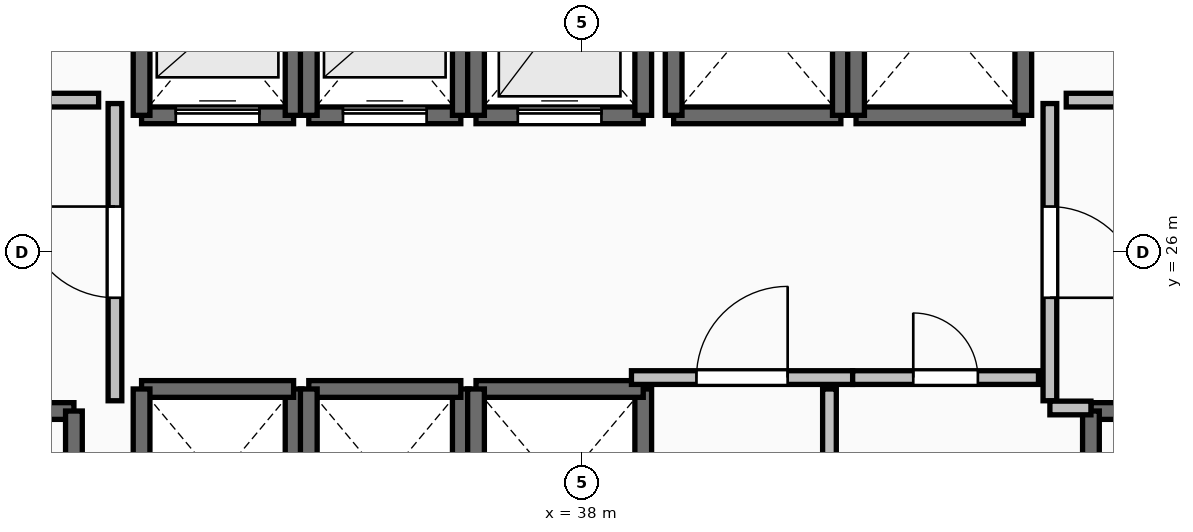
"""IFC4 building model, lengths in metres.
Left out: names, types, materials, properties, quantities, classifications, styles, units other than length and angle.
Written with IfcOpenShell. Run it as: python <this file> out.ifc"""

import sys

from ifc_helpers import new_model, si_unit, direction, frame, frame_2d, origin, place, context, subcontext, project, spatial, rectangle, extrude, element, fill, save


model = new_model("IFC4")
c1 = context("Model", 3, precision=1e-05, world=origin(), true_north=direction((0.0, 1.0)))
c2 = subcontext(c1, "Body", "Model", "MODEL_VIEW")
j1 = project(units=[si_unit("LENGTHUNIT", "METRE"), si_unit("PLANEANGLEUNIT", "RADIAN")], contexts=[c1])
p1 = place(None, origin())
s1 = spatial("IfcSite", under=j1, at=p1, CompositionType="ELEMENT")
p2 = place(p1, origin())
s2 = spatial("IfcBuilding", under=s1, at=p2, CompositionType="ELEMENT")
p3 = place(p2, frame((0.0, 0.0, 48.5)))
s3 = spatial("IfcBuildingStorey", under=s2, at=p3, CompositionType="ELEMENT", Elevation=48.5)
p4 = place(p3, frame((27.94, 23.91, 0.0), z_axis=(0.0, 0.0, 1.0), x_axis=(1.0, 0.0, 0.0)))
e1 = element("IfcWall", 1, at=p4, inside=s3, PredefinedType="SOLIDWALL", context=c2, shape_type="SweptSolid", body=[
    extrude(rectangle(XDim=3.37, YDim=0.22, at=frame_2d((1.685, 0.0))), origin(), (0.0, 0.0, 1.0), 3.24),
])
p5 = place(p4, frame((1.135, 0.0, 0.0)))
e2 = element("IfcOpeningElement", 2, at=p5, cuts=e1, PredefinedType="OPENING", context=c2, shape_type="SweptSolid", body=[
    extrude(rectangle(XDim=1.1, YDim=2.15, at=frame_2d((0.55, 1.075))), frame((0.0, 0.125, 0.0), z_axis=(0.0, -1.0, 0.0), x_axis=(1.0, 0.0, 0.0)), (0.0, 0.0, 1.0), 0.25),
])
p6 = place(p3, frame((31.31, 23.91, 0.0), z_axis=(0.0, 0.0, 1.0), x_axis=(0.0, -1.0, 0.0)))
e3 = element("IfcWall", 3, at=p6, inside=s3, PredefinedType="SOLIDWALL", context=c2, shape_type="SweptSolid", body=[
    extrude(rectangle(XDim=7.42, YDim=0.22, at=frame_2d((3.71, 0.0))), origin(), (0.0, 0.0, 1.0), 3.24),
])
p7 = place(p3, frame((44.69, 23.91, 0.0), z_axis=(0.0, 0.0, 1.0), x_axis=(1.0, 0.0, 0.0)))
e4 = element("IfcWall", 4, at=p7, inside=s3, PredefinedType="SOLIDWALL", context=c2, shape_type="SweptSolid", body=[
    extrude(rectangle(XDim=3.37, YDim=0.22, at=frame_2d((1.685, 0.0))), origin(), (0.0, 0.0, 1.0), 3.24),
])
p8 = place(p7, frame((1.135, 0.0, 0.0)))
e5 = element("IfcOpeningElement", 5, at=p8, cuts=e4, PredefinedType="OPENING", context=c2, shape_type="SweptSolid", body=[
    extrude(rectangle(XDim=1.1, YDim=2.15, at=frame_2d((0.55, 1.075))), frame((0.0, 0.125, 0.0), z_axis=(0.0, -1.0, 0.0), x_axis=(1.0, 0.0, 0.0)), (0.0, 0.0, 1.0), 0.25),
])
p9 = place(p3, frame((44.69, 16.49, 0.0), z_axis=(0.0, 0.0, 1.0), x_axis=(0.0, 1.0, 0.0)))
e6 = element("IfcWall", 6, at=p9, inside=s3, PredefinedType="SOLIDWALL", context=c2, shape_type="SweptSolid", body=[
    extrude(rectangle(XDim=7.42, YDim=0.22, at=frame_2d((3.71, 0.0))), origin(), (0.0, 0.0, 1.0), 3.24),
])
p10 = place(p3, frame((32.2, 27.8, 0.0), z_axis=(0.0, 0.0, 1.0), x_axis=(1.0, 0.0, 0.0)))
e7 = element("IfcWall", 7, at=p10, inside=s3, PredefinedType="SOLIDWALL", context=c2, shape_type="SweptSolid", body=[
    extrude(rectangle(XDim=2.0, YDim=0.22, at=frame_2d((1.0, 0.0))), origin(), (0.0, 0.0, 1.0), 3.24),
])
p11 = place(p10, frame((0.45, 0.0, 0.0)))
e8 = element("IfcOpeningElement", 8, at=p11, cuts=e7, PredefinedType="OPENING", context=c2, shape_type="SweptSolid", body=[
    extrude(rectangle(XDim=1.1, YDim=2.2, at=frame_2d((0.55, 1.1))), frame((0.0, 0.125, 0.0), z_axis=(0.0, -1.0, 0.0), x_axis=(1.0, 0.0, 0.0)), (0.0, 0.0, 1.0), 0.25),
])
for number, where, z_axis, x_axis in (
    (9, (34.2, 27.8, 0.0), (0.0, 0.0, 1.0), (0.0, 1.0, 0.0)),
    (10, (32.2, 30.2, 0.0), (0.0, 0.0, 1.0), (0.0, -1.0, 0.0)),
):
    element("IfcWall", number, at=place(p3, frame(where, z_axis=z_axis, x_axis=x_axis)), inside=s3, PredefinedType="SOLIDWALL", context=c2, shape_type="SweptSolid", body=[
        extrude(rectangle(XDim=2.4, YDim=0.22, at=frame_2d((1.2, 0.0))), origin(), (0.0, 0.0, 1.0), 3.24),
    ])
p12 = place(p3, frame((34.4, 27.8, 0.0), z_axis=(0.0, 0.0, 1.0), x_axis=(1.0, 0.0, 0.0)))
e11 = element("IfcWall", 11, at=p12, inside=s3, PredefinedType="SOLIDWALL", context=c2, shape_type="SweptSolid", body=[
    extrude(rectangle(XDim=2.0, YDim=0.22, at=frame_2d((1.0, 0.0))), origin(), (0.0, 0.0, 1.0), 3.24),
])
p13 = place(p12, frame((0.45, 0.0, 0.0)))
e12 = element("IfcOpeningElement", 12, at=p13, cuts=e11, PredefinedType="OPENING", context=c2, shape_type="SweptSolid", body=[
    extrude(rectangle(XDim=1.1, YDim=2.2, at=frame_2d((0.55, 1.1))), frame((0.0, 0.125, 0.0), z_axis=(0.0, -1.0, 0.0), x_axis=(1.0, 0.0, 0.0)), (0.0, 0.0, 1.0), 0.25),
])
for number, where, z_axis, x_axis in (
    (13, (36.4, 27.8, 0.0), (0.0, 0.0, 1.0), (0.0, 1.0, 0.0)),
    (14, (34.4, 30.2, 0.0), (0.0, 0.0, 1.0), (0.0, -1.0, 0.0)),
):
    element("IfcWall", number, at=place(p3, frame(where, z_axis=z_axis, x_axis=x_axis)), inside=s3, PredefinedType="SOLIDWALL", context=c2, shape_type="SweptSolid", body=[
        extrude(rectangle(XDim=2.4, YDim=0.22, at=frame_2d((1.2, 0.0))), origin(), (0.0, 0.0, 1.0), 3.24),
    ])
p14 = place(p3, frame((36.6, 27.8, 0.0), z_axis=(0.0, 0.0, 1.0), x_axis=(1.0, 0.0, 0.0)))
e15 = element("IfcWall", 15, at=p14, inside=s3, PredefinedType="SOLIDWALL", context=c2, shape_type="SweptSolid", body=[
    extrude(rectangle(XDim=2.2, YDim=0.22, at=frame_2d((1.1, 0.0))), origin(), (0.0, 0.0, 1.0), 3.24),
])
p15 = place(p14, frame((0.55, 0.0, 0.0)))
e16 = element("IfcOpeningElement", 16, at=p15, cuts=e15, PredefinedType="OPENING", context=c2, shape_type="SweptSolid", body=[
    extrude(rectangle(XDim=1.1, YDim=2.2, at=frame_2d((0.55, 1.1))), frame((0.0, 0.125, 0.0), z_axis=(0.0, -1.0, 0.0), x_axis=(1.0, 0.0, 0.0)), (0.0, 0.0, 1.0), 0.25),
])
for number, where, z_axis, x_axis in (
    (17, (38.8, 27.8, 0.0), (0.0, 0.0, 1.0), (0.0, 1.0, 0.0)),
    (18, (36.6, 30.4, 0.0), (0.0, 0.0, 1.0), (0.0, -1.0, 0.0)),
):
    element("IfcWall", number, at=place(p3, frame(where, z_axis=z_axis, x_axis=x_axis)), inside=s3, PredefinedType="SOLIDWALL", context=c2, shape_type="SweptSolid", body=[
        extrude(rectangle(XDim=2.6, YDim=0.22, at=frame_2d((1.3, 0.0))), origin(), (0.0, 0.0, 1.0), 3.24),
    ])
p16 = place(p3, frame((34.2, 21.8, 0.0), z_axis=(0.0, 0.0, 1.0), x_axis=(0.0, 1.0, 0.0)))
e19 = element("IfcWall", 19, at=p16, inside=s3, PredefinedType="SOLIDWALL", context=c2, shape_type="SweptSolid", body=[
    extrude(rectangle(XDim=2.4, YDim=0.22, at=frame_2d((1.2, 0.0))), origin(), (0.0, 0.0, 1.0), 3.24),
])
p17 = place(p3, frame((34.2, 24.2, 0.0), z_axis=(0.0, 0.0, 1.0), x_axis=(-1.0, 0.0, 0.0)))
e20 = element("IfcWall", 20, at=p17, inside=s3, PredefinedType="SOLIDWALL", context=c2, shape_type="SweptSolid", body=[
    extrude(rectangle(XDim=2.0, YDim=0.22, at=frame_2d((1.0, 0.0))), origin(), (0.0, 0.0, 1.0), 3.24),
])
for number, where, z_axis, x_axis in (
    (21, (32.2, 24.2, 0.0), (0.0, 0.0, 1.0), (0.0, -1.0, 0.0)),
    (22, (36.4, 21.8, 0.0), (0.0, 0.0, 1.0), (0.0, 1.0, 0.0)),
):
    element("IfcWall", number, at=place(p3, frame(where, z_axis=z_axis, x_axis=x_axis)), inside=s3, PredefinedType="SOLIDWALL", context=c2, shape_type="SweptSolid", body=[
        extrude(rectangle(XDim=2.4, YDim=0.22, at=frame_2d((1.2, 0.0))), origin(), (0.0, 0.0, 1.0), 3.24),
    ])
p18 = place(p3, frame((36.4, 24.2, 0.0), z_axis=(0.0, 0.0, 1.0), x_axis=(-1.0, 0.0, 0.0)))
e23 = element("IfcWall", 23, at=p18, inside=s3, PredefinedType="SOLIDWALL", context=c2, shape_type="SweptSolid", body=[
    extrude(rectangle(XDim=2.0, YDim=0.22, at=frame_2d((1.0, 0.0))), origin(), (0.0, 0.0, 1.0), 3.24),
])
p19 = place(p3, frame((34.4, 24.2, 0.0), z_axis=(0.0, 0.0, 1.0), x_axis=(0.0, -1.0, 0.0)))
e24 = element("IfcWall", 24, at=p19, inside=s3, PredefinedType="SOLIDWALL", context=c2, shape_type="SweptSolid", body=[
    extrude(rectangle(XDim=2.4, YDim=0.22, at=frame_2d((1.2, 0.0))), origin(), (0.0, 0.0, 1.0), 3.24),
])
p20 = place(p3, frame((38.8, 21.6, 0.0), z_axis=(0.0, 0.0, 1.0), x_axis=(0.0, 1.0, 0.0)))
e25 = element("IfcWall", 25, at=p20, inside=s3, PredefinedType="SOLIDWALL", context=c2, shape_type="SweptSolid", body=[
    extrude(rectangle(XDim=2.6, YDim=0.22, at=frame_2d((1.3, 0.0))), origin(), (0.0, 0.0, 1.0), 3.24),
])
p21 = place(p3, frame((38.8, 24.2, 0.0), z_axis=(0.0, 0.0, 1.0), x_axis=(-1.0, 0.0, 0.0)))
e26 = element("IfcWall", 26, at=p21, inside=s3, PredefinedType="SOLIDWALL", context=c2, shape_type="SweptSolid", body=[
    extrude(rectangle(XDim=2.2, YDim=0.22, at=frame_2d((1.1, 0.0))), origin(), (0.0, 0.0, 1.0), 3.24),
])
p22 = place(p3, frame((36.6, 24.2, 0.0), z_axis=(0.0, 0.0, 1.0), x_axis=(0.0, -1.0, 0.0)))
e27 = element("IfcWall", 27, at=p22, inside=s3, PredefinedType="SOLIDWALL", context=c2, shape_type="SweptSolid", body=[
    extrude(rectangle(XDim=2.6, YDim=0.22, at=frame_2d((1.3, 0.0))), origin(), (0.0, 0.0, 1.0), 3.24),
])
p23 = place(p3, frame((39.2, 27.8, 0.0), z_axis=(0.0, 0.0, 1.0), x_axis=(1.0, 0.0, 0.0)))
e28 = element("IfcWall", 28, at=p23, inside=s3, PredefinedType="SOLIDWALL", context=c2, shape_type="SweptSolid", body=[
    extrude(rectangle(XDim=2.2, YDim=0.22, at=frame_2d((1.1, 0.0))), origin(), (0.0, 0.0, 1.0), 3.24),
])
for number, where, z_axis, x_axis in (
    (29, (41.4, 27.8, 0.0), (0.0, 0.0, 1.0), (0.0, 1.0, 0.0)),
    (30, (39.2, 30.4, 0.0), (0.0, 0.0, 1.0), (0.0, -1.0, 0.0)),
):
    element("IfcWall", number, at=place(p3, frame(where, z_axis=z_axis, x_axis=x_axis)), inside=s3, PredefinedType="SOLIDWALL", context=c2, shape_type="SweptSolid", body=[
        extrude(rectangle(XDim=2.6, YDim=0.22, at=frame_2d((1.3, 0.0))), origin(), (0.0, 0.0, 1.0), 3.24),
    ])
p24 = place(p3, frame((41.6, 27.8, 0.0), z_axis=(0.0, 0.0, 1.0), x_axis=(1.0, 0.0, 0.0)))
e31 = element("IfcWall", 31, at=p24, inside=s3, PredefinedType="SOLIDWALL", context=c2, shape_type="SweptSolid", body=[
    extrude(rectangle(XDim=2.2, YDim=0.22, at=frame_2d((1.1, 0.0))), origin(), (0.0, 0.0, 1.0), 3.24),
])
for number, where, z_axis, x_axis in (
    (32, (43.8, 27.8, 0.0), (0.0, 0.0, 1.0), (0.0, 1.0, 0.0)),
    (33, (41.6, 30.4, 0.0), (0.0, 0.0, 1.0), (0.0, -1.0, 0.0)),
):
    element("IfcWall", number, at=place(p3, frame(where, z_axis=z_axis, x_axis=x_axis)), inside=s3, PredefinedType="SOLIDWALL", context=c2, shape_type="SweptSolid", body=[
        extrude(rectangle(XDim=2.6, YDim=0.22, at=frame_2d((1.3, 0.0))), origin(), (0.0, 0.0, 1.0), 3.24),
    ])
p25 = place(p3, frame((31.85, 24.045, 0.0), z_axis=(0.0, 0.0, 1.0), x_axis=(0.0, 1.0, 0.0)))
e34 = element("IfcWall", 34, at=p25, inside=s3, PredefinedType="PARTITIONING", context=c2, shape_type="SweptSolid", body=[
    extrude(rectangle(XDim=3.91, YDim=0.18, at=frame_2d((1.955, 0.0))), origin(), (0.0, 0.0, 1.0), 3.24),
])
p26 = place(p25, frame((1.355, 0.0, 0.0)))
e35 = element("IfcOpeningElement", 35, at=p26, cuts=e34, PredefinedType="OPENING", context=c2, shape_type="SweptSolid", body=[
    extrude(rectangle(XDim=1.2, YDim=2.15, at=frame_2d((0.6, 1.075))), frame((0.0, 0.105, 0.0), z_axis=(0.0, -1.0, 0.0), x_axis=(1.0, 0.0, 0.0)), (0.0, 0.0, 1.0), 0.21),
])
p27 = place(p3, frame((44.15, 27.955, 0.0), z_axis=(0.0, 0.0, 1.0), x_axis=(0.0, -1.0, 0.0)))
e36 = element("IfcWall", 36, at=p27, inside=s3, PredefinedType="PARTITIONING", context=c2, shape_type="SweptSolid", body=[
    extrude(rectangle(XDim=3.91, YDim=0.18, at=frame_2d((1.955, 0.0))), origin(), (0.0, 0.0, 1.0), 3.24),
])
p28 = place(p27, frame((1.355, 0.0, 0.0)))
e37 = element("IfcOpeningElement", 37, at=p28, cuts=e36, PredefinedType="OPENING", context=c2, shape_type="SweptSolid", body=[
    extrude(rectangle(XDim=1.2, YDim=2.15, at=frame_2d((0.6, 1.075))), frame((0.0, 0.105, 0.0), z_axis=(0.0, -1.0, 0.0), x_axis=(1.0, 0.0, 0.0)), (0.0, 0.0, 1.0), 0.21),
])
p29 = place(p3, frame((44.15, 23.95, 0.0), z_axis=(0.0, 0.0, 1.0), x_axis=(1.0, 0.0, 0.0)))
e38 = element("IfcWall", 38, at=p29, inside=s3, PredefinedType="PARTITIONING", context=c2, shape_type="SweptSolid", body=[
    extrude(rectangle(XDim=0.54, YDim=0.18, at=frame_2d((0.27, 0.0))), origin(), (0.0, 0.0, 1.0), 3.24),
])
p30 = place(p3, frame((38.645, 24.35, 0.0), z_axis=(0.0, 0.0, 1.0), x_axis=(1.0, 0.0, 0.0)))
e39 = element("IfcWall", 39, at=p30, inside=s3, PredefinedType="PARTITIONING", context=c2, shape_type="SweptSolid", body=[
    extrude(rectangle(XDim=2.91, YDim=0.18, at=frame_2d((1.455, 0.0))), origin(), (0.0, 0.0, 1.0), 3.24),
])
p31 = place(p30, frame((0.855, 0.0, 0.0)))
e40 = element("IfcOpeningElement", 40, at=p31, cuts=e39, PredefinedType="OPENING", context=c2, shape_type="SweptSolid", body=[
    extrude(rectangle(XDim=1.2, YDim=2.15, at=frame_2d((0.6, 1.075))), frame((0.0, 0.105, 0.0), z_axis=(0.0, -1.0, 0.0), x_axis=(1.0, 0.0, 0.0)), (0.0, 0.0, 1.0), 0.21),
])
p32 = place(p3, frame((41.555, 24.35, 0.0), z_axis=(0.0, 0.0, 1.0), x_axis=(1.0, 0.0, 0.0)))
e41 = element("IfcWall", 41, at=p32, inside=s3, PredefinedType="PARTITIONING", context=c2, shape_type="SweptSolid", body=[
    extrude(rectangle(XDim=2.445, YDim=0.18, at=frame_2d((1.223, 0.0))), origin(), (0.0, 0.0, 1.0), 3.24),
])
p33 = place(p32, frame((0.798, 0.0, 0.0)))
e42 = element("IfcOpeningElement", 42, at=p33, cuts=e41, PredefinedType="OPENING", context=c2, shape_type="SweptSolid", body=[
    extrude(rectangle(XDim=0.85, YDim=2.1, at=frame_2d((0.425, 1.05))), frame((0.0, 0.105, 0.0), z_axis=(0.0, -1.0, 0.0), x_axis=(1.0, 0.0, 0.0)), (0.0, 0.0, 1.0), 0.21),
])
p34 = place(p3, frame((41.25, 20.305, 0.0), z_axis=(0.0, 0.0, 1.0), x_axis=(0.0, 1.0, 0.0)))
e43 = element("IfcWall", 43, at=p34, inside=s3, PredefinedType="PARTITIONING", context=c2, shape_type="SweptSolid", body=[
    extrude(rectangle(XDim=3.895, YDim=0.18, at=frame_2d((1.948, 0.0))), origin(), (0.0, 0.0, 1.0), 3.24),
])
p35 = place(p34, frame((1.522, 0.0, 0.0)))
e44 = element("IfcOpeningElement", 44, at=p35, cuts=e43, PredefinedType="OPENING", context=c2, shape_type="SweptSolid", body=[
    extrude(rectangle(XDim=0.85, YDim=2.1, at=frame_2d((0.425, 1.05))), frame((0.0, 0.105, 0.0), z_axis=(0.0, -1.0, 0.0), x_axis=(1.0, 0.0, 0.0)), (0.0, 0.0, 1.0), 0.21),
])
for number, where, z_axis, x_axis in (
    (45, (31.635, 28.0, 0.0), (0.0, 0.0, 1.0), (-1.0, 0.0, 0.0)),
    (46, (45.28, 28.0, 0.0), (0.0, 0.0, 1.0), (-1.0, 0.0, 0.0)),
):
    element("IfcWall", number, at=place(p3, frame(where, z_axis=z_axis, x_axis=x_axis)), inside=s3, PredefinedType="PARTITIONING", context=c2, shape_type="SweptSolid", body=[
        extrude(rectangle(XDim=0.915, YDim=0.18, at=frame_2d((0.458, 0.0))), origin(), (0.0, 0.0, 1.0), 3.24),
    ])
p36 = place(p11, origin())
e47 = element("IfcDoor", 47, at=p36, inside=s3, OperationType="SLIDING_TO_LEFT", PredefinedType="DOOR", context=c2, shape_type="SweptSolid", body=[
    extrude(rectangle(XDim=1.1, YDim=2.2, at=frame_2d((0.55, 1.1))), frame((0.0, 0.025, 0.0), z_axis=(0.0, -1.0, 0.0), x_axis=(1.0, 0.0, 0.0)), (0.0, 0.0, 1.0), 0.05),
])
fill(e8, e47)
p37 = place(p13, origin())
e48 = element("IfcDoor", 48, at=p37, inside=s3, OperationType="SLIDING_TO_LEFT", PredefinedType="DOOR", context=c2, shape_type="SweptSolid", body=[
    extrude(rectangle(XDim=1.1, YDim=2.2, at=frame_2d((0.55, 1.1))), frame((0.0, 0.025, 0.0), z_axis=(0.0, -1.0, 0.0), x_axis=(1.0, 0.0, 0.0)), (0.0, 0.0, 1.0), 0.05),
])
fill(e12, e48)
p38 = place(p15, origin())
e49 = element("IfcDoor", 49, at=p38, inside=s3, OperationType="SLIDING_TO_LEFT", PredefinedType="DOOR", context=c2, shape_type="SweptSolid", body=[
    extrude(rectangle(XDim=1.1, YDim=2.2, at=frame_2d((0.55, 1.1))), frame((0.0, 0.025, 0.0), z_axis=(0.0, -1.0, 0.0), x_axis=(1.0, 0.0, 0.0)), (0.0, 0.0, 1.0), 0.05),
])
fill(e16, e49)
p39 = place(p26, origin())
e50 = element("IfcDoor", 50, at=p39, inside=s3, OperationType="SINGLE_SWING_RIGHT", PredefinedType="DOOR", context=c2, shape_type="SweptSolid", body=[
    extrude(rectangle(XDim=1.2, YDim=2.15, at=frame_2d((0.6, 1.075))), frame((0.0, 0.025, 0.0), z_axis=(0.0, -1.0, 0.0), x_axis=(1.0, 0.0, 0.0)), (0.0, 0.0, 1.0), 0.05),
])
fill(e35, e50)
p40 = place(p28, origin())
e51 = element("IfcDoor", 51, at=p40, inside=s3, OperationType="SINGLE_SWING_RIGHT", PredefinedType="DOOR", context=c2, shape_type="SweptSolid", body=[
    extrude(rectangle(XDim=1.2, YDim=2.15, at=frame_2d((0.6, 1.075))), frame((0.0, 0.025, 0.0), z_axis=(0.0, -1.0, 0.0), x_axis=(1.0, 0.0, 0.0)), (0.0, 0.0, 1.0), 0.05),
])
fill(e37, e51)
p41 = place(p31, origin())
e52 = element("IfcDoor", 52, at=p41, inside=s3, OperationType="SINGLE_SWING_RIGHT", PredefinedType="DOOR", context=c2, shape_type="SweptSolid", body=[
    extrude(rectangle(XDim=1.2, YDim=2.15, at=frame_2d((0.6, 1.075))), frame((0.0, 0.025, 0.0), z_axis=(0.0, -1.0, 0.0), x_axis=(1.0, 0.0, 0.0)), (0.0, 0.0, 1.0), 0.05),
])
fill(e40, e52)
p42 = place(p33, origin())
e53 = element("IfcDoor", 53, at=p42, inside=s3, OperationType="SINGLE_SWING_LEFT", PredefinedType="DOOR", context=c2, shape_type="SweptSolid", body=[
    extrude(rectangle(XDim=0.85, YDim=2.1, at=frame_2d((0.425, 1.05))), frame((0.0, 0.025, 0.0), z_axis=(0.0, -1.0, 0.0), x_axis=(1.0, 0.0, 0.0)), (0.0, 0.0, 1.0), 0.05),
])
fill(e42, e53)
save(model, sys.argv[1])
